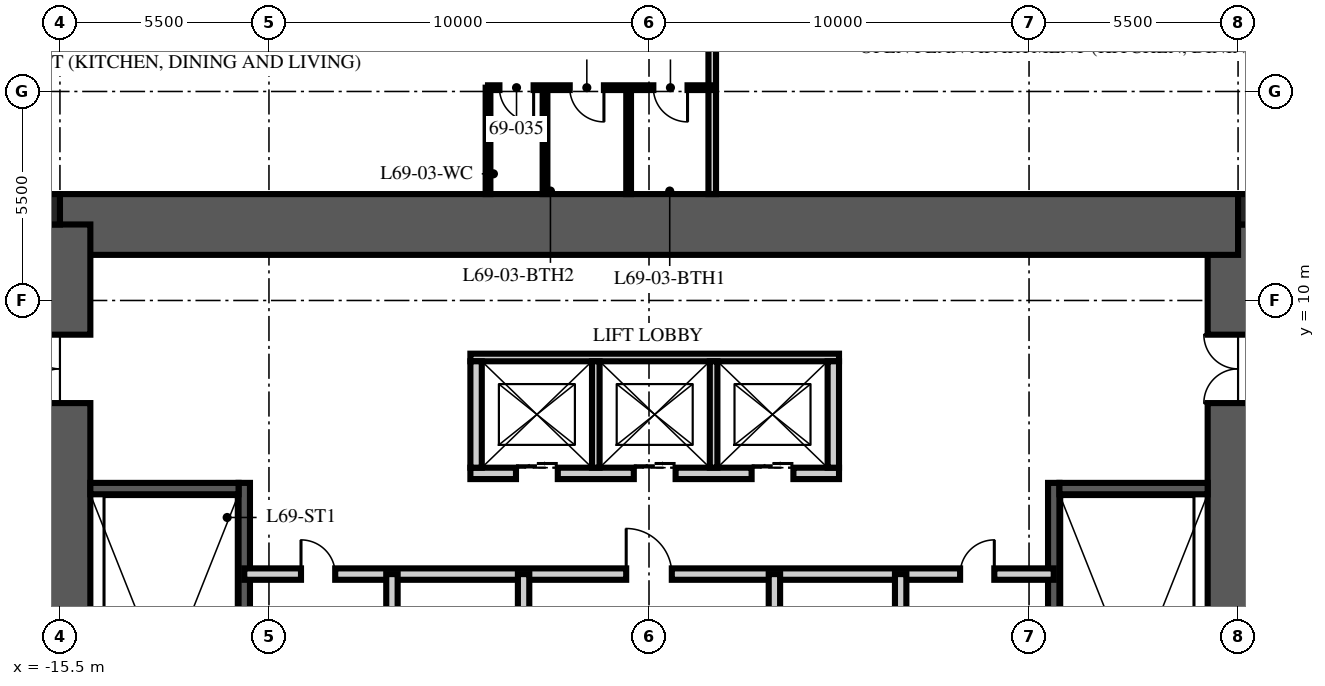
"""IFC4 building model, lengths in metres.
Left out: names, types, materials, properties, quantities, classifications, styles, units other than length and angle.
Written with IfcOpenShell. Run it as: python <this file> out.ifc"""

import sys

from ifc_helpers import new_model, si_unit, direction, frame, frame_2d, origin, origin_2d, place, context, subcontext, project, spatial, rectangle, extrude, element, fill, save


model = new_model("IFC4")
c1 = context("Model", 3, precision=1e-05, world=origin(), true_north=direction((0.0, 1.0)))
c2 = subcontext(c1, "Body", "Model", "MODEL_VIEW")
j1 = project(units=[si_unit("LENGTHUNIT", "METRE"), si_unit("PLANEANGLEUNIT", "RADIAN")], contexts=[c1])
p1 = place(None, origin())
s1 = spatial("IfcSite", under=j1, at=p1, CompositionType="ELEMENT")
p2 = place(p1, origin())
s2 = spatial("IfcBuilding", under=s1, at=p2, CompositionType="ELEMENT")
p3 = place(p2, frame((0.0, 0.0, 274.5)))
s3 = spatial("IfcBuildingStorey", under=s2, at=p3, CompositionType="ELEMENT", Elevation=274.5)
p4 = place(p3, frame((15.5, -12.0, -0.25), z_axis=(0.0, 0.0, 1.0), x_axis=(0.0, 1.0, 0.0)))
e1 = element("IfcWall", 1, at=p4, inside=s3, PredefinedType="SHEAR", context=c2, shape_type="SweptSolid", body=[
    extrude(rectangle(XDim=24.0, YDim=1.6, at=frame_2d((12.0, 0.0))), origin(), (0.0, 0.0, 1.0), 3.65),
])
p5 = place(p4, frame((3.2, 0.0, 0.25)))
e2 = element("IfcOpeningElement", 2, at=p5, cuts=e1, PredefinedType="OPENING", context=c2, shape_type="SweptSolid", body=[
    extrude(rectangle(XDim=1.2, YDim=2.1, at=frame_2d((0.6, 1.05))), frame((0.0, 0.81, 0.0), z_axis=(0.0, -1.0, 0.0), x_axis=(1.0, 0.0, 0.0)), (0.0, 0.0, 1.0), 1.62),
])
p6 = place(p4, frame((19.3, 0.0, 0.25)))
e3 = element("IfcOpeningElement", 3, at=p6, cuts=e1, PredefinedType="OPENING", context=c2, shape_type="SweptSolid", body=[
    extrude(rectangle(XDim=1.8, YDim=2.1, at=frame_2d((0.9, 1.05))), frame((0.0, 0.81, 0.0), z_axis=(0.0, -1.0, 0.0), x_axis=(1.0, 0.0, 0.0)), (0.0, 0.0, 1.0), 1.62),
])
p7 = place(p3, frame((-15.5, 12.0, -0.25), z_axis=(0.0, 0.0, 1.0), x_axis=(1.0, 0.0, 0.0)))
e4 = element("IfcWall", 4, at=p7, inside=s3, PredefinedType="SHEAR", context=c2, shape_type="SweptSolid", body=[
    extrude(rectangle(XDim=31.0, YDim=1.6, at=frame_2d((15.5, 0.0))), origin(), (0.0, 0.0, 1.0), 3.65),
])
p8 = place(p3, frame((-15.5, -12.0, -0.25), z_axis=(0.0, 0.0, 1.0), x_axis=(0.0, 1.0, 0.0)))
e5 = element("IfcWall", 5, at=p8, inside=s3, PredefinedType="SHEAR", context=c2, shape_type="SweptSolid", body=[
    extrude(rectangle(XDim=24.0, YDim=1.6, at=frame_2d((12.0, 0.0))), origin(), (0.0, 0.0, 1.0), 3.65),
])
p9 = place(p8, frame((3.2, 0.0, 0.25)))
e6 = element("IfcOpeningElement", 6, at=p9, cuts=e5, PredefinedType="OPENING", context=c2, shape_type="SweptSolid", body=[
    extrude(rectangle(XDim=1.2, YDim=2.1, at=frame_2d((0.6, 1.05))), frame((0.0, 0.81, 0.0), z_axis=(0.0, -1.0, 0.0), x_axis=(1.0, 0.0, 0.0)), (0.0, 0.0, 1.0), 1.62),
])
p10 = place(p8, frame((19.3, 0.0, 0.25)))
e7 = element("IfcOpeningElement", 7, at=p10, cuts=e5, PredefinedType="OPENING", context=c2, shape_type="SweptSolid", body=[
    extrude(rectangle(XDim=1.8, YDim=2.1, at=frame_2d((0.9, 1.05))), frame((0.0, 0.81, 0.0), z_axis=(0.0, -1.0, 0.0), x_axis=(1.0, 0.0, 0.0)), (0.0, 0.0, 1.0), 1.62),
])
for number, where, z_axis, x_axis in (
    (8, (15.9, 12.4, -0.25), (0.0, 0.0, 1.0), (1.0, 0.0, 0.0)),
    (9, (-15.9, 12.4, -0.25), (0.0, 0.0, 1.0), (1.0, 0.0, 0.0)),
):
    element("IfcColumn", number, at=place(p3, frame(where, z_axis=z_axis, x_axis=x_axis)), inside=s3, PredefinedType="COLUMN", context=c2, shape_type="SweptSolid", body=[
        extrude(rectangle(XDim=0.8, YDim=0.8, at=origin_2d()), origin(), (0.0, 0.0, 1.0), 3.65),
    ])
p11 = place(p3, frame((-10.65, -4.9, 0.0), z_axis=(0.0, 0.0, 1.0), x_axis=(0.0, 1.0, 0.0)))
e10 = element("IfcWall", 10, at=p11, inside=s3, PredefinedType="SOLIDWALL", context=c2, shape_type="SweptSolid", body=[
    extrude(rectangle(XDim=10.1, YDim=0.3, at=frame_2d((5.05, 0.0))), origin(), (0.0, 0.0, 1.0), 3.4),
])
p12 = place(p3, frame((-14.7, 5.05, 0.0), z_axis=(0.0, 0.0, 1.0), x_axis=(1.0, 0.0, 0.0)))
e11 = element("IfcWall", 11, at=p12, inside=s3, PredefinedType="SOLIDWALL", context=c2, shape_type="SweptSolid", body=[
    extrude(rectangle(XDim=3.9, YDim=0.3, at=frame_2d((1.95, 0.0))), origin(), (0.0, 0.0, 1.0), 3.4),
])
p13 = place(p3, frame((10.65, -4.9, 0.0), z_axis=(0.0, 0.0, 1.0), x_axis=(0.0, 1.0, 0.0)))
e12 = element("IfcWall", 12, at=p13, inside=s3, PredefinedType="SOLIDWALL", context=c2, shape_type="SweptSolid", body=[
    extrude(rectangle(XDim=10.1, YDim=0.3, at=frame_2d((5.05, 0.0))), origin(), (0.0, 0.0, 1.0), 3.4),
])
p14 = place(p3, frame((14.7, 5.05, 0.0), z_axis=(0.0, 0.0, 1.0), x_axis=(-1.0, 0.0, 0.0)))
e13 = element("IfcWall", 13, at=p14, inside=s3, PredefinedType="SOLIDWALL", context=c2, shape_type="SweptSolid", body=[
    extrude(rectangle(XDim=3.9, YDim=0.3, at=frame_2d((1.95, 0.0))), origin(), (0.0, 0.0, 1.0), 3.4),
])
p15 = place(p3, frame((-4.7, 5.45, 0.0), z_axis=(0.0, 0.0, 1.0), x_axis=(1.0, 0.0, 0.0)))
e14 = element("IfcWall", 14, at=p15, inside=s3, PredefinedType="PARTITIONING", context=c2, shape_type="SweptSolid", body=[
    extrude(rectangle(XDim=9.7, YDim=0.3, at=frame_2d((4.85, 0.0))), origin(), (0.0, 0.0, 1.0), 3.4),
])
p16 = place(p15, frame((1.2, 0.0, 0.0)))
e15 = element("IfcOpeningElement", 15, at=p16, cuts=e14, PredefinedType="OPENING", context=c2, shape_type="SweptSolid", body=[
    extrude(rectangle(XDim=1.1, YDim=2.1, at=frame_2d((0.55, 1.05))), frame((0.0, 0.16, 0.0), z_axis=(0.0, -1.0, 0.0), x_axis=(1.0, 0.0, 0.0)), (0.0, 0.0, 1.0), 0.32),
])
p17 = place(p15, frame((4.3, 0.0, 0.0)))
e16 = element("IfcOpeningElement", 16, at=p17, cuts=e14, PredefinedType="OPENING", context=c2, shape_type="SweptSolid", body=[
    extrude(rectangle(XDim=1.1, YDim=2.1, at=frame_2d((0.55, 1.05))), frame((0.0, 0.16, 0.0), z_axis=(0.0, -1.0, 0.0), x_axis=(1.0, 0.0, 0.0)), (0.0, 0.0, 1.0), 0.32),
])
p18 = place(p15, frame((7.4, 0.0, 0.0)))
e17 = element("IfcOpeningElement", 17, at=p18, cuts=e14, PredefinedType="OPENING", context=c2, shape_type="SweptSolid", body=[
    extrude(rectangle(XDim=1.1, YDim=2.1, at=frame_2d((0.55, 1.05))), frame((0.0, 0.16, 0.0), z_axis=(0.0, -1.0, 0.0), x_axis=(1.0, 0.0, 0.0)), (0.0, 0.0, 1.0), 0.32),
])
p19 = place(p3, frame((-4.7, 8.5, 0.0), z_axis=(0.0, 0.0, 1.0), x_axis=(1.0, 0.0, 0.0)))
e18 = element("IfcWall", 18, at=p19, inside=s3, PredefinedType="PARTITIONING", context=c2, shape_type="SweptSolid", body=[
    extrude(rectangle(XDim=9.7, YDim=0.2, at=frame_2d((4.85, 0.0))), origin(), (0.0, 0.0, 1.0), 3.4),
])
for number, where, z_axis, x_axis in (
    (19, (-4.55, 5.6, 0.0), (0.0, 0.0, 1.0), (0.0, 1.0, 0.0)),
    (20, (4.85, 5.6, 0.0), (0.0, 0.0, 1.0), (0.0, 1.0, 0.0)),
):
    element("IfcWall", number, at=place(p3, frame(where, z_axis=z_axis, x_axis=x_axis)), inside=s3, PredefinedType="PARTITIONING", context=c2, shape_type="SweptSolid", body=[
        extrude(rectangle(XDim=2.8, YDim=0.3, at=frame_2d((1.4, 0.0))), origin(), (0.0, 0.0, 1.0), 3.4),
    ])
for number, where, z_axis, x_axis in (
    (21, (-1.4, 5.6, 0.0), (0.0, 0.0, 1.0), (0.0, 1.0, 0.0)),
    (22, (1.7, 5.6, 0.0), (0.0, 0.0, 1.0), (0.0, 1.0, 0.0)),
):
    element("IfcWall", number, at=place(p3, frame(where, z_axis=z_axis, x_axis=x_axis)), inside=s3, PredefinedType="PARTITIONING", context=c2, shape_type="SweptSolid", body=[
        extrude(rectangle(XDim=2.8, YDim=0.2, at=frame_2d((1.4, 0.0))), origin(), (0.0, 0.0, 1.0), 3.4),
    ])
p20 = place(p3, frame((-10.65, 2.8, 0.0), z_axis=(0.0, 0.0, 1.0), x_axis=(1.0, 0.0, 0.0)))
e23 = element("IfcWall", 23, at=p20, inside=s3, PredefinedType="PARTITIONING", context=c2, shape_type="SweptSolid", body=[
    extrude(rectangle(XDim=21.3, YDim=0.3, at=frame_2d((10.65, 0.0))), origin(), (0.0, 0.0, 1.0), 3.4),
])
p21 = place(p20, frame((10.05, 0.0, 0.0)))
e24 = element("IfcOpeningElement", 24, at=p21, cuts=e23, PredefinedType="OPENING", context=c2, shape_type="SweptSolid", body=[
    extrude(rectangle(XDim=1.2, YDim=2.1, at=frame_2d((0.6, 1.05))), frame((0.0, 0.16, 0.0), z_axis=(0.0, -1.0, 0.0), x_axis=(1.0, 0.0, 0.0)), (0.0, 0.0, 1.0), 0.32),
])
p22 = place(p20, frame((1.493, 0.0, 0.0)))
e25 = element("IfcOpeningElement", 25, at=p22, cuts=e23, PredefinedType="OPENING", context=c2, shape_type="SweptSolid", body=[
    extrude(rectangle(XDim=0.9, YDim=2.1, at=frame_2d((0.45, 1.05))), frame((0.0, 0.16, 0.0), z_axis=(0.0, -1.0, 0.0), x_axis=(1.0, 0.0, 0.0)), (0.0, 0.0, 1.0), 0.32),
])
p23 = place(p20, frame((18.836, 0.0, 0.0)))
e26 = element("IfcOpeningElement", 26, at=p23, cuts=e23, PredefinedType="OPENING", context=c2, shape_type="SweptSolid", body=[
    extrude(rectangle(XDim=0.9, YDim=2.1, at=frame_2d((0.45, 1.05))), frame((0.0, 0.16, 0.0), z_axis=(0.0, -1.0, 0.0), x_axis=(1.0, 0.0, 0.0)), (0.0, 0.0, 1.0), 0.32),
])
p24 = place(p3, frame((-3.3, -6.65, 0.0), z_axis=(0.0, 0.0, 1.0), x_axis=(0.0, 1.0, 0.0)))
e27 = element("IfcWall", 27, at=p24, inside=s3, PredefinedType="PARTITIONING", context=c2, shape_type="SweptSolid", body=[
    extrude(rectangle(XDim=9.45, YDim=0.3, at=frame_2d((4.725, 0.0))), origin(), (0.0, 0.0, 1.0), 3.4),
])
p25 = place(p24, frame((4.275, 0.0, 0.0)))
e28 = element("IfcOpeningElement", 28, at=p25, cuts=e27, PredefinedType="OPENING", context=c2, shape_type="SweptSolid", body=[
    extrude(rectangle(XDim=0.9, YDim=2.1, at=frame_2d((0.45, 1.05))), frame((0.0, 0.16, 0.0), z_axis=(0.0, -1.0, 0.0), x_axis=(1.0, 0.0, 0.0)), (0.0, 0.0, 1.0), 0.32),
])
p26 = place(p3, frame((3.3, -6.65, 0.0), z_axis=(0.0, 0.0, 1.0), x_axis=(0.0, 1.0, 0.0)))
e29 = element("IfcWall", 29, at=p26, inside=s3, PredefinedType="PARTITIONING", context=c2, shape_type="SweptSolid", body=[
    extrude(rectangle(XDim=9.45, YDim=0.3, at=frame_2d((4.725, 0.0))), origin(), (0.0, 0.0, 1.0), 3.4),
])
p27 = place(p26, frame((4.275, 0.0, 0.0)))
e30 = element("IfcOpeningElement", 30, at=p27, cuts=e29, PredefinedType="OPENING", context=c2, shape_type="SweptSolid", body=[
    extrude(rectangle(XDim=0.9, YDim=2.1, at=frame_2d((0.45, 1.05))), frame((0.0, 0.16, 0.0), z_axis=(0.0, -1.0, 0.0), x_axis=(1.0, 0.0, 0.0)), (0.0, 0.0, 1.0), 0.32),
])
for number, where, z_axis, x_axis in (
    (31, (-6.764, -6.65, 0.0), (0.0, 0.0, 1.0), (0.0, 1.0, 0.0)),
    (32, (6.622, -6.65, 0.0), (0.0, 0.0, 1.0), (0.0, 1.0, 0.0)),
):
    element("IfcWall", number, at=place(p3, frame(where, z_axis=z_axis, x_axis=x_axis)), inside=s3, PredefinedType="PARTITIONING", context=c2, shape_type="SweptSolid", body=[
        extrude(rectangle(XDim=9.45, YDim=0.3, at=frame_2d((4.725, 0.0))), origin(), (0.0, 0.0, 1.0), 3.4),
    ])
p28 = place(p3, frame((1.664, 12.8, 0.0), z_axis=(0.0, 0.0, 1.0), x_axis=(0.0, 1.0, 0.0)))
e33 = element("IfcWall", 33, at=p28, inside=s3, PredefinedType="PARTITIONING", context=c2, shape_type="SweptSolid", body=[
    extrude(rectangle(XDim=12.65, YDim=0.2, at=frame_2d((6.325, 0.0))), origin(), (0.0, 0.0, 1.0), 2.75),
])
p29 = place(p3, frame((1.664, 15.6, 0.0), z_axis=(0.0, 0.0, 1.0), x_axis=(-1.0, 0.0, 0.0)))
e34 = element("IfcWall", 34, at=p29, inside=s3, PredefinedType="PARTITIONING", context=c2, shape_type="SweptSolid", body=[
    extrude(rectangle(XDim=5.9, YDim=0.125, at=frame_2d((2.95, 0.0))), origin(), (0.0, 0.0, 1.0), 2.2),
])
p30 = place(p29, frame((0.65, 0.0, 0.0)))
e35 = element("IfcOpeningElement", 35, at=p30, cuts=e34, PredefinedType="OPENING", context=c2, shape_type="SweptSolid", body=[
    extrude(rectangle(XDim=0.9, YDim=2.1, at=frame_2d((0.45, 1.05))), frame((0.0, 0.073, 0.0), z_axis=(0.0, -1.0, 0.0), x_axis=(1.0, 0.0, 0.0)), (0.0, 0.0, 1.0), 0.145),
])
p31 = place(p29, frame((2.85, 0.0, 0.0)))
e36 = element("IfcOpeningElement", 36, at=p31, cuts=e34, PredefinedType="OPENING", context=c2, shape_type="SweptSolid", body=[
    extrude(rectangle(XDim=0.9, YDim=2.1, at=frame_2d((0.45, 1.05))), frame((0.0, 0.073, 0.0), z_axis=(0.0, -1.0, 0.0), x_axis=(1.0, 0.0, 0.0)), (0.0, 0.0, 1.0), 0.145),
])
p32 = place(p29, frame((4.7, 0.0, 0.0)))
e37 = element("IfcOpeningElement", 37, at=p32, cuts=e34, PredefinedType="OPENING", context=c2, shape_type="SweptSolid", body=[
    extrude(rectangle(XDim=0.9, YDim=2.1, at=frame_2d((0.45, 1.05))), frame((0.0, 0.073, 0.0), z_axis=(0.0, -1.0, 0.0), x_axis=(1.0, 0.0, 0.0)), (0.0, 0.0, 1.0), 0.145),
])
p33 = place(p3, frame((-0.536, 12.8, 0.0), z_axis=(0.0, 0.0, 1.0), x_axis=(0.0, 1.0, 0.0)))
e38 = element("IfcWall", 38, at=p33, inside=s3, PredefinedType="PARTITIONING", context=c2, shape_type="SweptSolid", body=[
    extrude(rectangle(XDim=2.8, YDim=0.125, at=frame_2d((1.4, 0.0))), origin(), (0.0, 0.0, 1.0), 2.2),
])
p34 = place(p3, frame((-2.736, 12.8, 0.0), z_axis=(0.0, 0.0, 1.0), x_axis=(0.0, 1.0, 0.0)))
e39 = element("IfcWall", 39, at=p34, inside=s3, PredefinedType="PARTITIONING", context=c2, shape_type="SweptSolid", body=[
    extrude(rectangle(XDim=2.8, YDim=0.125, at=frame_2d((1.4, 0.0))), origin(), (0.0, 0.0, 1.0), 3.4),
])
p35 = place(p3, frame((-4.236, 12.8, 0.0), z_axis=(0.0, 0.0, 1.0), x_axis=(0.0, 1.0, 0.0)))
e40 = element("IfcWall", 40, at=p35, inside=s3, PredefinedType="PARTITIONING", context=c2, shape_type="SweptSolid", body=[
    extrude(rectangle(XDim=2.8, YDim=0.125, at=frame_2d((1.4, 0.0))), origin(), (0.0, 0.0, 1.0), 2.2),
])
p36 = place(p10, origin())
e41 = element("IfcDoor", 41, at=p36, inside=s3, OperationType="DOUBLE_DOOR_SINGLE_SWING", PredefinedType="DOOR", context=c2, shape_type="SweptSolid", body=[
    extrude(rectangle(XDim=1.8, YDim=2.1, at=frame_2d((0.9, 1.05))), frame((0.0, 0.025, 0.0), z_axis=(0.0, -1.0, 0.0), x_axis=(1.0, 0.0, 0.0)), (0.0, 0.0, 1.0), 0.05),
])
fill(e7, e41)
p37 = place(p6, origin())
e42 = element("IfcDoor", 42, at=p37, inside=s3, OperationType="DOUBLE_DOOR_SINGLE_SWING", PredefinedType="DOOR", context=c2, shape_type="SweptSolid", body=[
    extrude(rectangle(XDim=1.8, YDim=2.1, at=frame_2d((0.9, 1.05))), frame((0.0, 0.025, 0.0), z_axis=(0.0, -1.0, 0.0), x_axis=(1.0, 0.0, 0.0)), (0.0, 0.0, 1.0), 0.05),
])
fill(e3, e42)
p38 = place(p16, origin())
e43 = element("IfcDoor", 43, at=p38, inside=s3, OperationType="DOUBLE_DOOR_SLIDING", PredefinedType="DOOR", context=c2, shape_type="SweptSolid", body=[
    extrude(rectangle(XDim=1.1, YDim=2.1, at=frame_2d((0.55, 1.05))), frame((0.0, 0.025, 0.0), z_axis=(0.0, -1.0, 0.0), x_axis=(1.0, 0.0, 0.0)), (0.0, 0.0, 1.0), 0.05),
])
fill(e15, e43)
p39 = place(p17, origin())
e44 = element("IfcDoor", 44, at=p39, inside=s3, OperationType="DOUBLE_DOOR_SLIDING", PredefinedType="DOOR", context=c2, shape_type="SweptSolid", body=[
    extrude(rectangle(XDim=1.1, YDim=2.1, at=frame_2d((0.55, 1.05))), frame((0.0, 0.025, 0.0), z_axis=(0.0, -1.0, 0.0), x_axis=(1.0, 0.0, 0.0)), (0.0, 0.0, 1.0), 0.05),
])
fill(e16, e44)
p40 = place(p18, origin())
e45 = element("IfcDoor", 45, at=p40, inside=s3, OperationType="DOUBLE_DOOR_SLIDING", PredefinedType="DOOR", context=c2, shape_type="SweptSolid", body=[
    extrude(rectangle(XDim=1.1, YDim=2.1, at=frame_2d((0.55, 1.05))), frame((0.0, 0.025, 0.0), z_axis=(0.0, -1.0, 0.0), x_axis=(1.0, 0.0, 0.0)), (0.0, 0.0, 1.0), 0.05),
])
fill(e17, e45)
p41 = place(p21, origin())
e46 = element("IfcDoor", 46, at=p41, inside=s3, OperationType="SINGLE_SWING_LEFT", PredefinedType="DOOR", context=c2, shape_type="SweptSolid", body=[
    extrude(rectangle(XDim=1.2, YDim=2.1, at=frame_2d((0.6, 1.05))), frame((0.0, 0.025, 0.0), z_axis=(0.0, -1.0, 0.0), x_axis=(1.0, 0.0, 0.0)), (0.0, 0.0, 1.0), 0.05),
])
fill(e24, e46)
p42 = place(p22, origin())
e47 = element("IfcDoor", 47, at=p42, inside=s3, OperationType="SINGLE_SWING_LEFT", PredefinedType="DOOR", context=c2, shape_type="SweptSolid", body=[
    extrude(rectangle(XDim=0.9, YDim=2.1, at=frame_2d((0.45, 1.05))), frame((0.0, 0.025, 0.0), z_axis=(0.0, -1.0, 0.0), x_axis=(1.0, 0.0, 0.0)), (0.0, 0.0, 1.0), 0.05),
])
fill(e25, e47)
p43 = place(p23, origin())
e48 = element("IfcDoor", 48, at=p43, inside=s3, OperationType="SINGLE_SWING_RIGHT", PredefinedType="DOOR", context=c2, shape_type="SweptSolid", body=[
    extrude(rectangle(XDim=0.9, YDim=2.1, at=frame_2d((0.45, 1.05))), frame((0.0, 0.025, 0.0), z_axis=(0.0, -1.0, 0.0), x_axis=(1.0, 0.0, 0.0)), (0.0, 0.0, 1.0), 0.05),
])
fill(e26, e48)
p44 = place(p30, origin())
e49 = element("IfcDoor", 49, at=p44, inside=s3, OperationType="SINGLE_SWING_LEFT", PredefinedType="DOOR", context=c2, shape_type="SweptSolid", body=[
    extrude(rectangle(XDim=0.9, YDim=2.1, at=frame_2d((0.45, 1.05))), frame((0.0, 0.025, 0.0), z_axis=(0.0, -1.0, 0.0), x_axis=(1.0, 0.0, 0.0)), (0.0, 0.0, 1.0), 0.05),
])
fill(e35, e49)
p45 = place(p31, origin())
e50 = element("IfcDoor", 50, at=p45, inside=s3, OperationType="SINGLE_SWING_LEFT", PredefinedType="DOOR", context=c2, shape_type="SweptSolid", body=[
    extrude(rectangle(XDim=0.9, YDim=2.1, at=frame_2d((0.45, 1.05))), frame((0.0, 0.025, 0.0), z_axis=(0.0, -1.0, 0.0), x_axis=(1.0, 0.0, 0.0)), (0.0, 0.0, 1.0), 0.05),
])
fill(e36, e50)
p46 = place(p32, origin())
e51 = element("IfcDoor", 51, at=p46, inside=s3, OperationType="SINGLE_SWING_LEFT", PredefinedType="DOOR", context=c2, shape_type="SweptSolid", body=[
    extrude(rectangle(XDim=0.9, YDim=2.1, at=frame_2d((0.45, 1.05))), frame((0.0, 0.025, 0.0), z_axis=(0.0, -1.0, 0.0), x_axis=(1.0, 0.0, 0.0)), (0.0, 0.0, 1.0), 0.05),
])
fill(e37, e51)
save(model, sys.argv[1])
